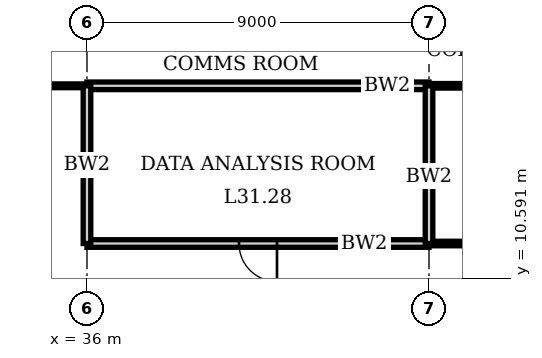
"""IFC4 building model, lengths in metres.
Left out: names, types, materials, properties, quantities, classifications, styles, units other than length and angle.
Written with IfcOpenShell. Run it as: python <this file> out.ifc"""

import sys

from ifc_helpers import new_model, si_unit, direction, frame, frame_2d, origin, place, context, subcontext, project, spatial, rectangle, extrude, element, fill, save


model = new_model("IFC4")
c1 = context("Model", 3, precision=1e-05, world=origin(), true_north=direction((0.0, 1.0)))
c2 = subcontext(c1, "Body", "Model", "MODEL_VIEW")
j1 = project(units=[si_unit("LENGTHUNIT", "METRE"), si_unit("PLANEANGLEUNIT", "RADIAN")], contexts=[c1])
p1 = place(None, origin())
s1 = spatial("IfcSite", under=j1, at=p1, CompositionType="ELEMENT")
p2 = place(p1, origin())
s2 = spatial("IfcBuilding", under=s1, at=p2, CompositionType="ELEMENT")
p3 = place(p2, frame((0.0, 0.0, 129.0)))
s3 = spatial("IfcBuildingStorey", under=s2, at=p3, CompositionType="ELEMENT", Elevation=129.0)
p4 = place(p3, frame((36.0, 11.5, 0.0), z_axis=(0.0, 0.0, 1.0), x_axis=(1.0, 0.0, 0.0)))
e1 = element("IfcWall", 1, at=p4, inside=s3, PredefinedType="SOLIDWALL", context=c2, shape_type="SweptSolid", body=[
    extrude(rectangle(XDim=9.0, YDim=0.2, at=frame_2d((4.5, 0.0))), origin(), (0.0, 0.0, 1.0), 3.75),
])
p5 = place(p4, frame((4.0, 0.0, 0.0)))
e2 = element("IfcOpeningElement", 2, at=p5, cuts=e1, PredefinedType="OPENING", context=c2, shape_type="SweptSolid", body=[
    extrude(rectangle(XDim=1.0, YDim=2.4, at=frame_2d((0.5, 1.2))), frame((0.0, 0.11, 0.0), z_axis=(0.0, -1.0, 0.0), x_axis=(1.0, 0.0, 0.0)), (0.0, 0.0, 1.0), 0.22),
])
p6 = place(p3, frame((45.0, 11.5, 0.0), z_axis=(0.0, 0.0, 1.0), x_axis=(1.0, 0.0, 0.0)))
e3 = element("IfcWall", 3, at=p6, inside=s3, PredefinedType="PARTITIONING", context=c2, shape_type="SweptSolid", body=[
    extrude(rectangle(XDim=4.5, YDim=0.12, at=frame_2d((2.25, 0.0))), origin(), (0.0, 0.0, 1.0), 3.75),
])
p7 = place(p6, frame((1.75, 0.0, 0.0)))
e4 = element("IfcOpeningElement", 4, at=p7, cuts=e3, PredefinedType="OPENING", context=c2, shape_type="SweptSolid", body=[
    extrude(rectangle(XDim=1.0, YDim=2.4, at=frame_2d((0.5, 1.2))), frame((0.0, 0.07, 0.0), z_axis=(0.0, -1.0, 0.0), x_axis=(1.0, 0.0, 0.0)), (0.0, 0.0, 1.0), 0.14),
])
p8 = place(p3, frame((36.0, 15.65, 0.0), z_axis=(0.0, 0.0, 1.0), x_axis=(1.0, 0.0, 0.0)))
e5 = element("IfcWall", 5, at=p8, inside=s3, PredefinedType="SOLIDWALL", context=c2, shape_type="SweptSolid", body=[
    extrude(rectangle(XDim=9.0, YDim=0.2, at=frame_2d((4.5, 0.0))), origin(), (0.0, 0.0, 1.0), 3.75),
])
p9 = place(p3, frame((45.0, 15.65, 0.0), z_axis=(0.0, 0.0, 1.0), x_axis=(1.0, 0.0, 0.0)))
e6 = element("IfcWall", 6, at=p9, inside=s3, PredefinedType="PARTITIONING", context=c2, shape_type="SweptSolid", body=[
    extrude(rectangle(XDim=4.5, YDim=0.12, at=frame_2d((2.25, 0.0))), origin(), (0.0, 0.0, 1.0), 3.75),
])
p10 = place(p3, frame((22.5, 15.65, 0.0), z_axis=(0.0, 0.0, 1.0), x_axis=(1.0, 0.0, 0.0)))
e7 = element("IfcWall", 7, at=p10, inside=s3, PredefinedType="PARTITIONING", context=c2, shape_type="SweptSolid", body=[
    extrude(rectangle(XDim=13.5, YDim=0.1, at=frame_2d((6.75, 0.0))), origin(), (0.0, 0.0, 1.0), 3.75),
])
p11 = place(p10, frame((6.25, 0.0, 0.0)))
e8 = element("IfcOpeningElement", 8, at=p11, cuts=e7, PredefinedType="OPENING", context=c2, shape_type="SweptSolid", body=[
    extrude(rectangle(XDim=1.0, YDim=2.4, at=frame_2d((0.5, 1.2))), frame((0.0, 0.06, 0.0), z_axis=(0.0, -1.0, 0.0), x_axis=(1.0, 0.0, 0.0)), (0.0, 0.0, 1.0), 0.12),
])
for number, where, z_axis, x_axis in (
    (9, (36.0, 11.5, 0.0), (0.0, 0.0, 1.0), (0.0, 1.0, 0.0)),
    (10, (45.0, 11.5, 0.0), (0.0, 0.0, 1.0), (0.0, 1.0, 0.0)),
):
    element("IfcWall", number, at=place(p3, frame(where, z_axis=z_axis, x_axis=x_axis)), inside=s3, PredefinedType="SOLIDWALL", context=c2, shape_type="SweptSolid", body=[
        extrude(rectangle(XDim=4.15, YDim=0.2, at=frame_2d((2.075, 0.0))), origin(), (0.0, 0.0, 1.0), 3.05),
    ])
p12 = place(p5, origin())
e11 = element("IfcDoor", 11, at=p12, inside=s3, OperationType="SINGLE_SWING_RIGHT", PredefinedType="DOOR", context=c2, shape_type="SweptSolid", body=[
    extrude(rectangle(XDim=1.0, YDim=2.4, at=frame_2d((0.5, 1.2))), frame((0.0, 0.035, 0.0), z_axis=(0.0, -1.0, 0.0), x_axis=(1.0, 0.0, 0.0)), (0.0, 0.0, 1.0), 0.07),
])
fill(e2, e11)
save(model, sys.argv[1])
